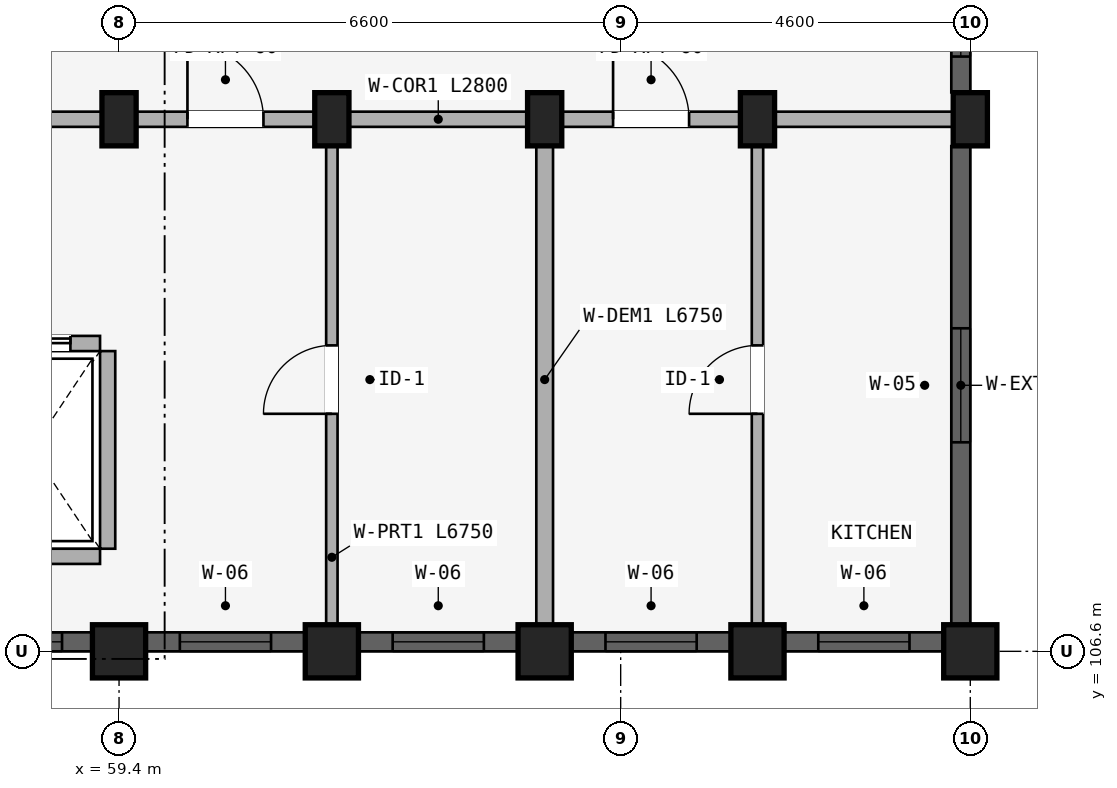
"""IFC4 building model, lengths in metres.
Left out: names, types, materials, properties, quantities, classifications, styles, units other than length and angle.
Written with IfcOpenShell. Run it as: python <this file> out.ifc"""

import sys

from ifc_helpers import new_model, si_unit, direction, frame, frame_2d, origin, origin_2d, place, context, subcontext, project, spatial, rectangle, extrude, element, fill, save


model = new_model("IFC4")
c1 = context("Model", 3, precision=1e-05, world=origin(), true_north=direction((0.0, 1.0)))
c2 = subcontext(c1, "Body", "Model", "MODEL_VIEW")
j1 = project(units=[si_unit("LENGTHUNIT", "METRE"), si_unit("PLANEANGLEUNIT", "RADIAN")], contexts=[c1])
p1 = place(None, origin())
s1 = spatial("IfcSite", under=j1, at=p1, CompositionType="ELEMENT")
p2 = place(p1, origin())
s2 = spatial("IfcBuilding", under=s1, at=p2, CompositionType="ELEMENT")
p3 = place(p2, frame((0.0, 0.0, 18.15)))
s3 = spatial("IfcBuildingStorey", under=s2, at=p3, CompositionType="ELEMENT", Elevation=18.15)
p4 = place(p3, frame((59.4, 106.6, 0.0), z_axis=(0.0, 0.0, 1.0), x_axis=(1.0, 0.0, 0.0)))
e1 = element("IfcColumn", 1, at=p4, inside=s3, PredefinedType="COLUMN", context=c2, shape_type="SweptSolid", body=[
    extrude(rectangle(XDim=0.7, YDim=0.7, at=origin_2d()), origin(), (0.0, 0.0, 1.0), 2.93),
])
p5 = place(p3, frame((59.4, 113.6, 0.0), z_axis=(0.0, 0.0, 1.0), x_axis=(1.0, 0.0, 0.0)))
e2 = element("IfcColumn", 2, at=p5, inside=s3, PredefinedType="COLUMN", context=c2, shape_type="SweptSolid", body=[
    extrude(rectangle(XDim=0.45, YDim=0.7, at=origin_2d()), origin(), (0.0, 0.0, 1.0), 2.93),
])
p6 = place(p3, frame((62.2, 106.6, 0.0), z_axis=(0.0, 0.0, 1.0), x_axis=(1.0, 0.0, 0.0)))
e3 = element("IfcColumn", 3, at=p6, inside=s3, PredefinedType="COLUMN", context=c2, shape_type="SweptSolid", body=[
    extrude(rectangle(XDim=0.7, YDim=0.7, at=origin_2d()), origin(), (0.0, 0.0, 1.0), 2.93),
])
p7 = place(p3, frame((62.2, 113.6, 0.0), z_axis=(0.0, 0.0, 1.0), x_axis=(1.0, 0.0, 0.0)))
e4 = element("IfcColumn", 4, at=p7, inside=s3, PredefinedType="COLUMN", context=c2, shape_type="SweptSolid", body=[
    extrude(rectangle(XDim=0.45, YDim=0.7, at=origin_2d()), origin(), (0.0, 0.0, 1.0), 2.93),
])
p8 = place(p3, frame((65.0, 106.6, 0.0), z_axis=(0.0, 0.0, 1.0), x_axis=(1.0, 0.0, 0.0)))
e5 = element("IfcColumn", 5, at=p8, inside=s3, PredefinedType="COLUMN", context=c2, shape_type="SweptSolid", body=[
    extrude(rectangle(XDim=0.7, YDim=0.7, at=origin_2d()), origin(), (0.0, 0.0, 1.0), 2.93),
])
p9 = place(p3, frame((65.0, 113.6, 0.0), z_axis=(0.0, 0.0, 1.0), x_axis=(1.0, 0.0, 0.0)))
e6 = element("IfcColumn", 6, at=p9, inside=s3, PredefinedType="COLUMN", context=c2, shape_type="SweptSolid", body=[
    extrude(rectangle(XDim=0.45, YDim=0.7, at=origin_2d()), origin(), (0.0, 0.0, 1.0), 2.93),
])
p10 = place(p3, frame((67.8, 106.6, 0.0), z_axis=(0.0, 0.0, 1.0), x_axis=(1.0, 0.0, 0.0)))
e7 = element("IfcColumn", 7, at=p10, inside=s3, PredefinedType="COLUMN", context=c2, shape_type="SweptSolid", body=[
    extrude(rectangle(XDim=0.7, YDim=0.7, at=origin_2d()), origin(), (0.0, 0.0, 1.0), 2.93),
])
p11 = place(p3, frame((67.8, 113.6, 0.0), z_axis=(0.0, 0.0, 1.0), x_axis=(1.0, 0.0, 0.0)))
e8 = element("IfcColumn", 8, at=p11, inside=s3, PredefinedType="COLUMN", context=c2, shape_type="SweptSolid", body=[
    extrude(rectangle(XDim=0.45, YDim=0.7, at=origin_2d()), origin(), (0.0, 0.0, 1.0), 2.93),
])
p12 = place(p3, frame((70.6, 106.6, 0.0), z_axis=(0.0, 0.0, 1.0), x_axis=(1.0, 0.0, 0.0)))
e9 = element("IfcColumn", 9, at=p12, inside=s3, PredefinedType="COLUMN", context=c2, shape_type="SweptSolid", body=[
    extrude(rectangle(XDim=0.7, YDim=0.7, at=origin_2d()), origin(), (0.0, 0.0, 1.0), 2.93),
])
p13 = place(p3, frame((70.6, 113.6, 0.0), z_axis=(0.0, 0.0, 1.0), x_axis=(1.0, 0.0, 0.0)))
e10 = element("IfcColumn", 10, at=p13, inside=s3, PredefinedType="COLUMN", context=c2, shape_type="SweptSolid", body=[
    extrude(rectangle(XDim=0.45, YDim=0.7, at=origin_2d()), origin(), (0.0, 0.0, 1.0), 2.93),
])
p14 = place(p3, frame((59.25, 107.95, 0.0), z_axis=(0.0, 0.0, 1.0), x_axis=(0.0, 1.0, 0.0)))
e11 = element("IfcWall", 11, at=p14, inside=s3, PredefinedType="STANDARD", context=c2, shape_type="SweptSolid", body=[
    extrude(rectangle(XDim=2.6, YDim=0.2, at=frame_2d((1.3, 0.0))), origin(), (0.0, 0.0, 1.0), 2.372),
])
p15 = place(p3, frame((57.35, 107.85, 0.0), z_axis=(0.0, 0.0, 1.0), x_axis=(1.0, 0.0, 0.0)))
e12 = element("IfcWall", 12, at=p15, inside=s3, PredefinedType="STANDARD", context=c2, shape_type="SweptSolid", body=[
    extrude(rectangle(XDim=1.8, YDim=0.2, at=frame_2d((0.9, 0.0))), origin(), (0.0, 0.0, 1.0), 2.93),
])
p16 = place(p3, frame((57.35, 110.65, 0.0), z_axis=(0.0, 0.0, 1.0), x_axis=(1.0, 0.0, 0.0)))
e13 = element("IfcWall", 13, at=p16, inside=s3, PredefinedType="STANDARD", context=c2, shape_type="SweptSolid", body=[
    extrude(rectangle(XDim=1.8, YDim=0.2, at=frame_2d((0.9, 0.0))), origin(), (0.0, 0.0, 1.0), 2.93),
])
p17 = place(p16, frame((0.39, 0.0, 0.0)))
e14 = element("IfcOpeningElement", 14, at=p17, cuts=e13, PredefinedType="OPENING", context=c2, shape_type="SweptSolid", body=[
    extrude(rectangle(XDim=1.02, YDim=2.15, at=frame_2d((0.51, 1.075))), frame((0.0, 0.11, 0.0), z_axis=(0.0, -1.0, 0.0), x_axis=(1.0, 0.0, 0.0)), (0.0, 0.0, 1.0), 0.22),
])
p18 = place(p3, frame((53.75, 113.6, 0.0), z_axis=(0.0, 0.0, 1.0), x_axis=(1.0, 0.0, 0.0)))
e15 = element("IfcWall", 15, at=p18, inside=s3, PredefinedType="STANDARD", context=c2, shape_type="SweptSolid", body=[
    extrude(rectangle(XDim=5.6, YDim=0.2, at=frame_2d((2.8, 0.0))), origin(), (0.0, 0.0, 1.0), 2.372),
])
p19 = place(p18, frame((1.91, 0.0, 0.0)))
e16 = element("IfcOpeningElement", 16, at=p19, cuts=e15, PredefinedType="OPENING", context=c2, shape_type="SweptSolid", body=[
    extrude(rectangle(XDim=1.22, YDim=2.15, at=frame_2d((0.61, 1.075))), frame((0.0, 0.11, 0.0), z_axis=(0.0, -1.0, 0.0), x_axis=(1.0, 0.0, 0.0)), (0.0, 0.0, 1.0), 0.22),
])
p20 = place(p3, frame((59.4, 113.6, 0.0), z_axis=(0.0, 0.0, 1.0), x_axis=(1.0, 0.0, 0.0)))
e17 = element("IfcWall", 17, at=p20, inside=s3, PredefinedType="STANDARD", context=c2, shape_type="SweptSolid", body=[
    extrude(rectangle(XDim=2.8, YDim=0.2, at=frame_2d((1.4, 0.0))), origin(), (0.0, 0.0, 1.0), 2.372),
])
p21 = place(p20, frame((0.9, 0.0, 0.0)))
e18 = element("IfcOpeningElement", 18, at=p21, cuts=e17, PredefinedType="OPENING", context=c2, shape_type="SweptSolid", body=[
    extrude(rectangle(XDim=1.0, YDim=2.15, at=frame_2d((0.5, 1.075))), frame((0.0, 0.11, 0.0), z_axis=(0.0, -1.0, 0.0), x_axis=(1.0, 0.0, 0.0)), (0.0, 0.0, 1.0), 0.22),
])
p22 = place(p3, frame((62.2, 113.6, 0.0), z_axis=(0.0, 0.0, 1.0), x_axis=(1.0, 0.0, 0.0)))
e19 = element("IfcWall", 19, at=p22, inside=s3, PredefinedType="STANDARD", context=c2, shape_type="SweptSolid", body=[
    extrude(rectangle(XDim=2.8, YDim=0.2, at=frame_2d((1.4, 0.0))), origin(), (0.0, 0.0, 1.0), 2.372),
])
p23 = place(p3, frame((65.0, 113.6, 0.0), z_axis=(0.0, 0.0, 1.0), x_axis=(1.0, 0.0, 0.0)))
e20 = element("IfcWall", 20, at=p23, inside=s3, PredefinedType="STANDARD", context=c2, shape_type="SweptSolid", body=[
    extrude(rectangle(XDim=2.8, YDim=0.2, at=frame_2d((1.4, 0.0))), origin(), (0.0, 0.0, 1.0), 2.372),
])
p24 = place(p23, frame((0.9, 0.0, 0.0)))
e21 = element("IfcOpeningElement", 21, at=p24, cuts=e20, PredefinedType="OPENING", context=c2, shape_type="SweptSolid", body=[
    extrude(rectangle(XDim=1.0, YDim=2.15, at=frame_2d((0.5, 1.075))), frame((0.0, 0.11, 0.0), z_axis=(0.0, -1.0, 0.0), x_axis=(1.0, 0.0, 0.0)), (0.0, 0.0, 1.0), 0.22),
])
p25 = place(p3, frame((67.8, 113.6, 0.0), z_axis=(0.0, 0.0, 1.0), x_axis=(1.0, 0.0, 0.0)))
e22 = element("IfcWall", 22, at=p25, inside=s3, PredefinedType="STANDARD", context=c2, shape_type="SweptSolid", body=[
    extrude(rectangle(XDim=2.8, YDim=0.2, at=frame_2d((1.4, 0.0))), origin(), (0.0, 0.0, 1.0), 2.372),
])
p26 = place(p3, frame((62.2, 106.8, 0.0), z_axis=(0.0, 0.0, 1.0), x_axis=(0.0, 1.0, 0.0)))
e23 = element("IfcWall", 23, at=p26, inside=s3, PredefinedType="PARTITIONING", context=c2, shape_type="SweptSolid", body=[
    extrude(rectangle(XDim=6.75, YDim=0.15, at=frame_2d((3.375, 0.0))), origin(), (0.0, 0.0, 1.0), 2.372),
])
p27 = place(p26, frame((2.925, 0.0, 0.0)))
e24 = element("IfcOpeningElement", 24, at=p27, cuts=e23, PredefinedType="OPENING", context=c2, shape_type="SweptSolid", body=[
    extrude(rectangle(XDim=0.9, YDim=2.1, at=frame_2d((0.45, 1.05))), frame((0.0, 0.085, 0.0), z_axis=(0.0, -1.0, 0.0), x_axis=(1.0, 0.0, 0.0)), (0.0, 0.0, 1.0), 0.17),
])
p28 = place(p3, frame((65.0, 106.8, 0.0), z_axis=(0.0, 0.0, 1.0), x_axis=(0.0, 1.0, 0.0)))
e25 = element("IfcWall", 25, at=p28, inside=s3, PredefinedType="STANDARD", context=c2, shape_type="SweptSolid", body=[
    extrude(rectangle(XDim=6.75, YDim=0.22, at=frame_2d((3.375, 0.0))), origin(), (0.0, 0.0, 1.0), 2.372),
])
p29 = place(p3, frame((67.8, 106.8, 0.0), z_axis=(0.0, 0.0, 1.0), x_axis=(0.0, 1.0, 0.0)))
e26 = element("IfcWall", 26, at=p29, inside=s3, PredefinedType="PARTITIONING", context=c2, shape_type="SweptSolid", body=[
    extrude(rectangle(XDim=6.75, YDim=0.15, at=frame_2d((3.375, 0.0))), origin(), (0.0, 0.0, 1.0), 2.372),
])
p30 = place(p29, frame((2.925, 0.0, 0.0)))
e27 = element("IfcOpeningElement", 27, at=p30, cuts=e26, PredefinedType="OPENING", context=c2, shape_type="SweptSolid", body=[
    extrude(rectangle(XDim=0.9, YDim=2.1, at=frame_2d((0.45, 1.05))), frame((0.0, 0.085, 0.0), z_axis=(0.0, -1.0, 0.0), x_axis=(1.0, 0.0, 0.0)), (0.0, 0.0, 1.0), 0.17),
])
p31 = place(p3, frame((56.628, 106.725, 0.0), z_axis=(0.0, 0.0, 1.0), x_axis=(1.0, 0.0, 0.0)))
e28 = element("IfcWall", 28, at=p31, inside=s3, PredefinedType="STANDARD", context=c2, shape_type="SweptSolid", body=[
    extrude(rectangle(XDim=2.422, YDim=0.25, at=frame_2d((1.211, 0.0))), origin(), (0.0, 0.0, 1.0), 2.472),
])
p32 = place(p31, frame((0.822, 0.0, 0.772)))
e29 = element("IfcOpeningElement", 29, at=p32, cuts=e28, PredefinedType="OPENING", context=c2, shape_type="SweptSolid", body=[
    extrude(rectangle(XDim=1.2, YDim=1.5, at=frame_2d((0.6, 0.75))), frame((0.0, 0.135, 0.0), z_axis=(0.0, -1.0, 0.0), x_axis=(1.0, 0.0, 0.0)), (0.0, 0.0, 1.0), 0.27),
])
p33 = place(p3, frame((59.753, 106.725, 0.0), z_axis=(0.0, 0.0, 1.0), x_axis=(1.0, 0.0, 0.0)))
e30 = element("IfcWall", 30, at=p33, inside=s3, PredefinedType="STANDARD", context=c2, shape_type="SweptSolid", body=[
    extrude(rectangle(XDim=2.093, YDim=0.25, at=frame_2d((1.046, 0.0))), origin(), (0.0, 0.0, 1.0), 2.472),
])
p34 = place(p33, frame((0.447, 0.0, 0.772)))
e31 = element("IfcOpeningElement", 31, at=p34, cuts=e30, PredefinedType="OPENING", context=c2, shape_type="SweptSolid", body=[
    extrude(rectangle(XDim=1.2, YDim=1.5, at=frame_2d((0.6, 0.75))), frame((0.0, 0.135, 0.0), z_axis=(0.0, -1.0, 0.0), x_axis=(1.0, 0.0, 0.0)), (0.0, 0.0, 1.0), 0.27),
])
p35 = place(p3, frame((62.553, 106.725, 0.0), z_axis=(0.0, 0.0, 1.0), x_axis=(1.0, 0.0, 0.0)))
e32 = element("IfcWall", 32, at=p35, inside=s3, PredefinedType="STANDARD", context=c2, shape_type="SweptSolid", body=[
    extrude(rectangle(XDim=2.093, YDim=0.25, at=frame_2d((1.046, 0.0))), origin(), (0.0, 0.0, 1.0), 2.472),
])
p36 = place(p35, frame((0.447, 0.0, 0.772)))
e33 = element("IfcOpeningElement", 33, at=p36, cuts=e32, PredefinedType="OPENING", context=c2, shape_type="SweptSolid", body=[
    extrude(rectangle(XDim=1.2, YDim=1.5, at=frame_2d((0.6, 0.75))), frame((0.0, 0.135, 0.0), z_axis=(0.0, -1.0, 0.0), x_axis=(1.0, 0.0, 0.0)), (0.0, 0.0, 1.0), 0.27),
])
p37 = place(p3, frame((65.354, 106.725, 0.0), z_axis=(0.0, 0.0, 1.0), x_axis=(1.0, 0.0, 0.0)))
e34 = element("IfcWall", 34, at=p37, inside=s3, PredefinedType="STANDARD", context=c2, shape_type="SweptSolid", body=[
    extrude(rectangle(XDim=2.093, YDim=0.25, at=frame_2d((1.046, 0.0))), origin(), (0.0, 0.0, 1.0), 2.472),
])
p38 = place(p37, frame((0.447, 0.0, 0.772)))
e35 = element("IfcOpeningElement", 35, at=p38, cuts=e34, PredefinedType="OPENING", context=c2, shape_type="SweptSolid", body=[
    extrude(rectangle(XDim=1.2, YDim=1.5, at=frame_2d((0.6, 0.75))), frame((0.0, 0.135, 0.0), z_axis=(0.0, -1.0, 0.0), x_axis=(1.0, 0.0, 0.0)), (0.0, 0.0, 1.0), 0.27),
])
p39 = place(p3, frame((68.154, 106.725, 0.0), z_axis=(0.0, 0.0, 1.0), x_axis=(1.0, 0.0, 0.0)))
e36 = element("IfcWall", 36, at=p39, inside=s3, PredefinedType="STANDARD", context=c2, shape_type="SweptSolid", body=[
    extrude(rectangle(XDim=2.093, YDim=0.25, at=frame_2d((1.046, 0.0))), origin(), (0.0, 0.0, 1.0), 2.472),
])
p40 = place(p39, frame((0.447, 0.0, 0.772)))
e37 = element("IfcOpeningElement", 37, at=p40, cuts=e36, PredefinedType="OPENING", context=c2, shape_type="SweptSolid", body=[
    extrude(rectangle(XDim=1.2, YDim=1.5, at=frame_2d((0.6, 0.75))), frame((0.0, 0.135, 0.0), z_axis=(0.0, -1.0, 0.0), x_axis=(1.0, 0.0, 0.0)), (0.0, 0.0, 1.0), 0.27),
])
p41 = place(p3, frame((70.475, 106.954, 0.0), z_axis=(0.0, 0.0, 1.0), x_axis=(0.0, 1.0, 0.0)))
e38 = element("IfcWall", 38, at=p41, inside=s3, PredefinedType="STANDARD", context=c2, shape_type="SweptSolid", body=[
    extrude(rectangle(XDim=6.293, YDim=0.25, at=frame_2d((3.146, 0.0))), origin(), (0.0, 0.0, 1.0), 2.372),
])
p42 = place(p41, frame((2.396, 0.0, 0.522)))
e39 = element("IfcOpeningElement", 39, at=p42, cuts=e38, PredefinedType="OPENING", context=c2, shape_type="SweptSolid", body=[
    extrude(rectangle(XDim=1.5, YDim=1.65, at=frame_2d((0.75, 0.825))), frame((0.0, 0.135, 0.0), z_axis=(0.0, -1.0, 0.0), x_axis=(1.0, 0.0, 0.0)), (0.0, 0.0, 1.0), 0.27),
])
p43 = place(p3, frame((70.475, 113.954, 0.0), z_axis=(0.0, 0.0, 1.0), x_axis=(0.0, 1.0, 0.0)))
e40 = element("IfcWall", 40, at=p43, inside=s3, PredefinedType="STANDARD", context=c2, shape_type="SweptSolid", body=[
    extrude(rectangle(XDim=1.693, YDim=0.25, at=frame_2d((0.846, 0.0))), origin(), (0.0, 0.0, 1.0), 2.372),
])
p44 = place(p43, frame((0.471, 0.0, 0.88)))
e41 = element("IfcOpeningElement", 41, at=p44, cuts=e40, PredefinedType="OPENING", context=c2, shape_type="SweptSolid", body=[
    extrude(rectangle(XDim=0.75, YDim=1.05, at=frame_2d((0.375, 0.525))), frame((0.0, 0.135, 0.0), z_axis=(0.0, -1.0, 0.0), x_axis=(1.0, 0.0, 0.0)), (0.0, 0.0, 1.0), 0.27),
])
p45 = place(p32, origin())
e42 = element("IfcWindow", 42, at=p45, inside=s3, PartitioningType="SINGLE_PANEL", PredefinedType="WINDOW", context=c2, shape_type="SweptSolid", body=[
    extrude(rectangle(XDim=1.2, YDim=1.5, at=frame_2d((0.6, 0.75))), frame((0.0, 0.03, 0.0), z_axis=(0.0, -1.0, 0.0), x_axis=(1.0, 0.0, 0.0)), (0.0, 0.0, 1.0), 0.06),
])
fill(e29, e42)
p46 = place(p34, origin())
e43 = element("IfcWindow", 43, at=p46, inside=s3, PartitioningType="SINGLE_PANEL", PredefinedType="WINDOW", context=c2, shape_type="SweptSolid", body=[
    extrude(rectangle(XDim=1.2, YDim=1.5, at=frame_2d((0.6, 0.75))), frame((0.0, 0.03, 0.0), z_axis=(0.0, -1.0, 0.0), x_axis=(1.0, 0.0, 0.0)), (0.0, 0.0, 1.0), 0.06),
])
fill(e31, e43)
p47 = place(p36, origin())
e44 = element("IfcWindow", 44, at=p47, inside=s3, PartitioningType="SINGLE_PANEL", PredefinedType="WINDOW", context=c2, shape_type="SweptSolid", body=[
    extrude(rectangle(XDim=1.2, YDim=1.5, at=frame_2d((0.6, 0.75))), frame((0.0, 0.03, 0.0), z_axis=(0.0, -1.0, 0.0), x_axis=(1.0, 0.0, 0.0)), (0.0, 0.0, 1.0), 0.06),
])
fill(e33, e44)
p48 = place(p38, origin())
e45 = element("IfcWindow", 45, at=p48, inside=s3, PartitioningType="SINGLE_PANEL", PredefinedType="WINDOW", context=c2, shape_type="SweptSolid", body=[
    extrude(rectangle(XDim=1.2, YDim=1.5, at=frame_2d((0.6, 0.75))), frame((0.0, 0.03, 0.0), z_axis=(0.0, -1.0, 0.0), x_axis=(1.0, 0.0, 0.0)), (0.0, 0.0, 1.0), 0.06),
])
fill(e35, e45)
p49 = place(p40, origin())
e46 = element("IfcWindow", 46, at=p49, inside=s3, PartitioningType="SINGLE_PANEL", PredefinedType="WINDOW", context=c2, shape_type="SweptSolid", body=[
    extrude(rectangle(XDim=1.2, YDim=1.5, at=frame_2d((0.6, 0.75))), frame((0.0, 0.03, 0.0), z_axis=(0.0, -1.0, 0.0), x_axis=(1.0, 0.0, 0.0)), (0.0, 0.0, 1.0), 0.06),
])
fill(e37, e46)
p50 = place(p42, origin())
e47 = element("IfcWindow", 47, at=p50, inside=s3, PartitioningType="DOUBLE_PANEL_VERTICAL", PredefinedType="WINDOW", context=c2, shape_type="SweptSolid", body=[
    extrude(rectangle(XDim=1.5, YDim=1.65, at=frame_2d((0.75, 0.825))), frame((0.0, 0.03, 0.0), z_axis=(0.0, -1.0, 0.0), x_axis=(1.0, 0.0, 0.0)), (0.0, 0.0, 1.0), 0.06),
])
fill(e39, e47)
p51 = place(p44, origin())
e48 = element("IfcWindow", 48, at=p51, inside=s3, PartitioningType="SINGLE_PANEL", PredefinedType="WINDOW", context=c2, shape_type="SweptSolid", body=[
    extrude(rectangle(XDim=0.75, YDim=1.05, at=frame_2d((0.375, 0.525))), frame((0.0, 0.03, 0.0), z_axis=(0.0, -1.0, 0.0), x_axis=(1.0, 0.0, 0.0)), (0.0, 0.0, 1.0), 0.06),
])
fill(e41, e48)
p52 = place(p17, origin())
e49 = element("IfcDoor", 49, at=p52, inside=s3, OperationType="SLIDING_TO_RIGHT", PredefinedType="DOOR", context=c2, shape_type="SweptSolid", body=[
    extrude(rectangle(XDim=1.02, YDim=2.15, at=frame_2d((0.51, 1.075))), frame((0.0, 0.025, 0.0), z_axis=(0.0, -1.0, 0.0), x_axis=(1.0, 0.0, 0.0)), (0.0, 0.0, 1.0), 0.05),
])
fill(e14, e49)
p53 = place(p21, frame((1.0, 0.0, 0.0), z_axis=(0.0, 0.0, 1.0), x_axis=(-1.0, 0.0, 0.0)))
e50 = element("IfcDoor", 50, at=p53, inside=s3, OperationType="SINGLE_SWING_RIGHT", PredefinedType="DOOR", context=c2, shape_type="SweptSolid", body=[
    extrude(rectangle(XDim=1.0, YDim=2.15, at=frame_2d((0.5, 1.075))), frame((0.0, 0.025, 0.0), z_axis=(0.0, -1.0, 0.0), x_axis=(1.0, 0.0, 0.0)), (0.0, 0.0, 1.0), 0.05),
])
fill(e18, e50)
p54 = place(p24, frame((1.0, 0.0, 0.0), z_axis=(0.0, 0.0, 1.0), x_axis=(-1.0, 0.0, 0.0)))
e51 = element("IfcDoor", 51, at=p54, inside=s3, OperationType="SINGLE_SWING_RIGHT", PredefinedType="DOOR", context=c2, shape_type="SweptSolid", body=[
    extrude(rectangle(XDim=1.0, YDim=2.15, at=frame_2d((0.5, 1.075))), frame((0.0, 0.025, 0.0), z_axis=(0.0, -1.0, 0.0), x_axis=(1.0, 0.0, 0.0)), (0.0, 0.0, 1.0), 0.05),
])
fill(e21, e51)
p55 = place(p27, origin())
e52 = element("IfcDoor", 52, at=p55, inside=s3, OperationType="SINGLE_SWING_LEFT", PredefinedType="DOOR", context=c2, shape_type="SweptSolid", body=[
    extrude(rectangle(XDim=0.9, YDim=2.1, at=frame_2d((0.45, 1.05))), frame((0.0, 0.025, 0.0), z_axis=(0.0, -1.0, 0.0), x_axis=(1.0, 0.0, 0.0)), (0.0, 0.0, 1.0), 0.05),
])
fill(e24, e52)
p56 = place(p30, frame((0.9, 0.0, 0.0), z_axis=(0.0, 0.0, 1.0), x_axis=(-1.0, 0.0, 0.0)))
e53 = element("IfcDoor", 53, at=p56, inside=s3, OperationType="SINGLE_SWING_RIGHT", PredefinedType="DOOR", context=c2, shape_type="SweptSolid", body=[
    extrude(rectangle(XDim=0.9, YDim=2.1, at=frame_2d((0.45, 1.05))), frame((0.0, 0.025, 0.0), z_axis=(0.0, -1.0, 0.0), x_axis=(1.0, 0.0, 0.0)), (0.0, 0.0, 1.0), 0.05),
])
fill(e27, e53)
save(model, sys.argv[1])
